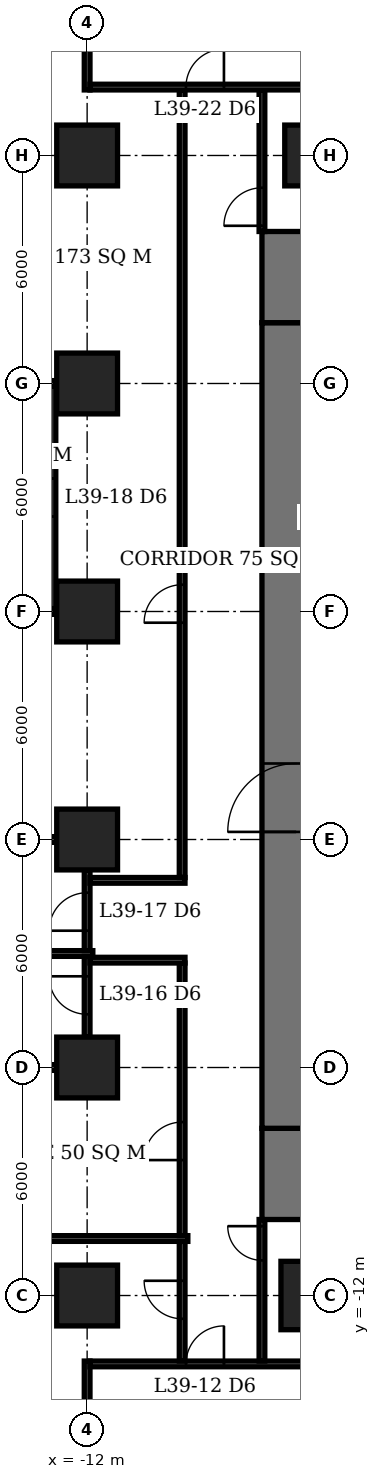
"""IFC4 building model, lengths in metres.
Left out: names, types, materials, properties, quantities, classifications, styles, units other than length and angle.
Written with IfcOpenShell. Run it as: python <this file> out.ifc"""

import sys

from ifc_helpers import new_model, si_unit, direction, frame, frame_2d, origin, origin_2d, place, context, subcontext, project, spatial, rectangle, extrude, element, fill, save


model = new_model("IFC4")
c1 = context("Model", 3, precision=1e-05, world=origin(), true_north=direction((0.0, 1.0)))
c2 = subcontext(c1, "Body", "Model", "MODEL_VIEW")
j1 = project(units=[si_unit("LENGTHUNIT", "METRE"), si_unit("PLANEANGLEUNIT", "RADIAN")], contexts=[c1])
p1 = place(None, origin())
s1 = spatial("IfcSite", under=j1, at=p1, CompositionType="ELEMENT")
p2 = place(p1, origin())
s2 = spatial("IfcBuilding", under=s1, at=p2, CompositionType="ELEMENT")
p3 = place(p2, frame((0.0, 0.0, 160.1)))
s3 = spatial("IfcBuildingStorey", under=s2, at=p3, CompositionType="ELEMENT", Elevation=160.1)
for number, where, z_axis, x_axis in (
    (1, (-12.0, -12.0, 0.0), (0.0, 0.0, 1.0), (1.0, 0.0, 0.0)),
    (2, (-12.0, -6.0, 0.0), (0.0, 0.0, 1.0), (1.0, 0.0, 0.0)),
    (3, (-12.0, 0.0, 0.0), (0.0, 0.0, 1.0), (1.0, 0.0, 0.0)),
    (4, (-12.0, 6.0, 0.0), (0.0, 0.0, 1.0), (1.0, 0.0, 0.0)),
    (5, (-12.0, 12.0, 0.0), (0.0, 0.0, 1.0), (1.0, 0.0, 0.0)),
    (6, (-12.0, 18.0, 0.0), (0.0, 0.0, 1.0), (1.0, 0.0, 0.0)),
):
    element("IfcColumn", number, at=place(p3, frame(where, z_axis=z_axis, x_axis=x_axis)), inside=s3, PredefinedType="COLUMN", context=c2, shape_type="SweptSolid", body=[
        extrude(rectangle(XDim=1.6, YDim=1.6, at=origin_2d()), origin(), (0.0, 0.0, 1.0), 3.9),
    ])
p4 = place(p3, frame((-6.0, -12.0, 0.0), z_axis=(0.0, 0.0, 1.0), x_axis=(1.0, 0.0, 0.0)))
e7 = element("IfcColumn", 7, at=p4, inside=s3, PredefinedType="COLUMN", context=c2, shape_type="SweptSolid", body=[
    extrude(rectangle(XDim=1.8, YDim=1.8, at=origin_2d()), origin(), (0.0, 0.0, 1.0), 3.9),
])
p5 = place(p3, frame((-6.0, 18.0, 0.0), z_axis=(0.0, 0.0, 1.0), x_axis=(1.0, 0.0, 0.0)))
e8 = element("IfcColumn", 8, at=p5, inside=s3, PredefinedType="COLUMN", context=c2, shape_type="SweptSolid", body=[
    extrude(rectangle(XDim=1.6, YDim=1.6, at=origin_2d()), origin(), (0.0, 0.0, 1.0), 3.9),
])
p6 = place(p3, frame((-6.5, -7.6, 0.0), z_axis=(0.0, 0.0, 1.0), x_axis=(0.0, 1.0, 0.0)))
e9 = element("IfcWall", 9, at=p6, inside=s3, PredefinedType="SHEAR", context=c2, shape_type="SweptSolid", body=[
    extrude(rectangle(XDim=21.2, YDim=1.8, at=frame_2d((10.6, 0.0))), origin(), (0.0, 0.0, 1.0), 3.9),
])
p7 = place(p6, frame((7.8, 0.0, 0.0)))
e10 = element("IfcOpeningElement", 10, at=p7, cuts=e9, PredefinedType="OPENING", context=c2, shape_type="SweptSolid", body=[
    extrude(rectangle(XDim=1.8, YDim=2.4, at=frame_2d((0.9, 1.2))), frame((0.0, 0.91, 0.0), z_axis=(0.0, -1.0, 0.0), x_axis=(1.0, 0.0, 0.0)), (0.0, 0.0, 1.0), 1.82),
])
for number, where, z_axis, x_axis in (
    (11, (-6.5, -10.0, 0.0), (0.0, 0.0, 1.0), (0.0, 1.0, 0.0)),
    (12, (-6.5, 13.6, 0.0), (0.0, 0.0, 1.0), (0.0, 1.0, 0.0)),
):
    element("IfcWall", number, at=place(p3, frame(where, z_axis=z_axis, x_axis=x_axis)), inside=s3, PredefinedType="SHEAR", context=c2, shape_type="SweptSolid", body=[
        extrude(rectangle(XDim=2.4, YDim=1.8, at=frame_2d((1.2, 0.0))), origin(), (0.0, 0.0, 1.0), 3.9),
    ])
p8 = place(p3, frame((-11.925, -13.8, 0.0), z_axis=(0.0, 0.0, 1.0), x_axis=(1.0, 0.0, 0.0)))
e13 = element("IfcWall", 13, at=p8, inside=s3, PredefinedType="PARTITIONING", context=c2, shape_type="SweptSolid", body=[
    extrude(rectangle(XDim=5.85, YDim=0.15, at=frame_2d((2.925, 0.0))), origin(), (0.0, 0.0, 1.0), 3.65),
])
p9 = place(p8, frame((2.525, 0.0, 0.0)))
e14 = element("IfcOpeningElement", 14, at=p9, cuts=e13, PredefinedType="OPENING", context=c2, shape_type="SweptSolid", body=[
    extrude(rectangle(XDim=1.0, YDim=2.1, at=frame_2d((0.5, 1.05))), frame((0.0, 0.085, 0.0), z_axis=(0.0, -1.0, 0.0), x_axis=(1.0, 0.0, 0.0)), (0.0, 0.0, 1.0), 0.17),
])
p10 = place(p3, frame((-17.35, -6.0, 0.0), z_axis=(0.0, 0.0, 1.0), x_axis=(1.0, 0.0, 0.0)))
e15 = element("IfcWall", 15, at=p10, inside=s3, PredefinedType="PARTITIONING", context=c2, shape_type="SweptSolid", body=[
    extrude(rectangle(XDim=4.55, YDim=0.15, at=frame_2d((2.275, 0.0))), origin(), (0.0, 0.0, 1.0), 3.65),
])
p11 = place(p3, frame((-19.4, -3.0, 0.0), z_axis=(0.0, 0.0, 1.0), x_axis=(1.0, 0.0, 0.0)))
e16 = element("IfcWall", 16, at=p11, inside=s3, PredefinedType="PARTITIONING", context=c2, shape_type="SweptSolid", body=[
    extrude(rectangle(XDim=7.55, YDim=0.15, at=frame_2d((3.775, 0.0))), origin(), (0.0, 0.0, 1.0), 3.65),
])
p12 = place(p3, frame((-17.35, 0.0, 0.0), z_axis=(0.0, 0.0, 1.0), x_axis=(1.0, 0.0, 0.0)))
e17 = element("IfcWall", 17, at=p12, inside=s3, PredefinedType="PARTITIONING", context=c2, shape_type="SweptSolid", body=[
    extrude(rectangle(XDim=4.55, YDim=0.15, at=frame_2d((2.275, 0.0))), origin(), (0.0, 0.0, 1.0), 3.65),
])
for number, where, z_axis, x_axis in (
    (18, (-17.35, 6.0, 0.0), (0.0, 0.0, 1.0), (1.0, 0.0, 0.0)),
    (19, (-17.35, 12.0, 0.0), (0.0, 0.0, 1.0), (1.0, 0.0, 0.0)),
):
    element("IfcWall", number, at=place(p3, frame(where, z_axis=z_axis, x_axis=x_axis)), inside=s3, PredefinedType="PARTITIONING", context=c2, shape_type="SweptSolid", body=[
        extrude(rectangle(XDim=4.525, YDim=0.15, at=frame_2d((2.263, 0.0))), origin(), (0.0, 0.0, 1.0), 3.65),
    ])
p13 = place(p3, frame((-11.925, 19.8, 0.0), z_axis=(0.0, 0.0, 1.0), x_axis=(1.0, 0.0, 0.0)))
e20 = element("IfcWall", 20, at=p13, inside=s3, PredefinedType="PARTITIONING", context=c2, shape_type="SweptSolid", body=[
    extrude(rectangle(XDim=5.85, YDim=0.15, at=frame_2d((2.925, 0.0))), origin(), (0.0, 0.0, 1.0), 3.65),
])
p14 = place(p13, frame((2.525, 0.0, 0.0)))
e21 = element("IfcOpeningElement", 21, at=p14, cuts=e20, PredefinedType="OPENING", context=c2, shape_type="SweptSolid", body=[
    extrude(rectangle(XDim=1.0, YDim=2.1, at=frame_2d((0.5, 1.05))), frame((0.0, 0.085, 0.0), z_axis=(0.0, -1.0, 0.0), x_axis=(1.0, 0.0, 0.0)), (0.0, 0.0, 1.0), 0.17),
])
p15 = place(p3, frame((-12.9, 6.075, 0.0), z_axis=(0.0, 0.0, 1.0), x_axis=(0.0, 1.0, 0.0)))
e22 = element("IfcWall", 22, at=p15, inside=s3, PredefinedType="PARTITIONING", context=c2, shape_type="SweptSolid", body=[
    extrude(rectangle(XDim=5.85, YDim=0.15, at=frame_2d((2.925, 0.0))), origin(), (0.0, 0.0, 1.0), 3.65),
])
p16 = place(p15, frame((2.425, 0.0, 0.0)))
e23 = element("IfcOpeningElement", 23, at=p16, cuts=e22, PredefinedType="OPENING", context=c2, shape_type="SweptSolid", body=[
    extrude(rectangle(XDim=1.0, YDim=2.1, at=frame_2d((0.5, 1.05))), frame((0.0, 0.085, 0.0), z_axis=(0.0, -1.0, 0.0), x_axis=(1.0, 0.0, 0.0)), (0.0, 0.0, 1.0), 0.17),
])
p17 = place(p3, frame((-12.0, -19.4, 0.0), z_axis=(0.0, 0.0, 1.0), x_axis=(0.0, 1.0, 0.0)))
e24 = element("IfcWall", 24, at=p17, inside=s3, PredefinedType="PARTITIONING", context=c2, shape_type="SweptSolid", body=[
    extrude(rectangle(XDim=5.675, YDim=0.15, at=frame_2d((2.837, 0.0))), origin(), (0.0, 0.0, 1.0), 3.65),
])
p18 = place(p3, frame((-12.0, -5.2, 0.0), z_axis=(0.0, 0.0, 1.0), x_axis=(0.0, 1.0, 0.0)))
e25 = element("IfcWall", 25, at=p18, inside=s3, PredefinedType="PARTITIONING", context=c2, shape_type="SweptSolid", body=[
    extrude(rectangle(XDim=2.125, YDim=0.15, at=frame_2d((1.062, 0.0))), origin(), (0.0, 0.0, 1.0), 3.65),
])
p19 = place(p18, frame((0.6, 0.0, 0.0)))
e26 = element("IfcOpeningElement", 26, at=p19, cuts=e25, PredefinedType="OPENING", context=c2, shape_type="SweptSolid", body=[
    extrude(rectangle(XDim=1.0, YDim=2.1, at=frame_2d((0.5, 1.05))), frame((0.0, 0.085, 0.0), z_axis=(0.0, -1.0, 0.0), x_axis=(1.0, 0.0, 0.0)), (0.0, 0.0, 1.0), 0.17),
])
p20 = place(p3, frame((-12.0, -2.925, 0.0), z_axis=(0.0, 0.0, 1.0), x_axis=(0.0, 1.0, 0.0)))
e27 = element("IfcWall", 27, at=p20, inside=s3, PredefinedType="PARTITIONING", context=c2, shape_type="SweptSolid", body=[
    extrude(rectangle(XDim=2.125, YDim=0.15, at=frame_2d((1.062, 0.0))), origin(), (0.0, 0.0, 1.0), 3.65),
])
p21 = place(p20, frame((0.525, 0.0, 0.0)))
e28 = element("IfcOpeningElement", 28, at=p21, cuts=e27, PredefinedType="OPENING", context=c2, shape_type="SweptSolid", body=[
    extrude(rectangle(XDim=1.0, YDim=2.1, at=frame_2d((0.5, 1.05))), frame((0.0, 0.085, 0.0), z_axis=(0.0, -1.0, 0.0), x_axis=(1.0, 0.0, 0.0)), (0.0, 0.0, 1.0), 0.17),
])
p22 = place(p3, frame((-12.0, 19.725, 0.0), z_axis=(0.0, 0.0, 1.0), x_axis=(0.0, 1.0, 0.0)))
e29 = element("IfcWall", 29, at=p22, inside=s3, PredefinedType="PARTITIONING", context=c2, shape_type="SweptSolid", body=[
    extrude(rectangle(XDim=3.54, YDim=0.15, at=frame_2d((1.77, 0.0))), origin(), (0.0, 0.0, 1.0), 3.65),
])
p23 = place(p3, frame((-19.4, -10.5, 0.0), z_axis=(0.0, 0.0, 1.0), x_axis=(1.0, 0.0, 0.0)))
e30 = element("IfcWall", 30, at=p23, inside=s3, PredefinedType="PARTITIONING", context=c2, shape_type="SweptSolid", body=[
    extrude(rectangle(XDim=10.05, YDim=0.15, at=frame_2d((5.025, 0.0))), origin(), (0.0, 0.0, 1.0), 3.65),
])
for number, where, z_axis, x_axis in (
    (31, (-11.925, -3.175, 0.0), (0.0, 0.0, 1.0), (1.0, 0.0, 0.0)),
    (32, (-11.925, -1.075, 0.0), (0.0, 0.0, 1.0), (1.0, 0.0, 0.0)),
):
    element("IfcWall", number, at=place(p3, frame(where, z_axis=z_axis, x_axis=x_axis)), inside=s3, PredefinedType="PARTITIONING", context=c2, shape_type="SweptSolid", body=[
        extrude(rectangle(XDim=2.5, YDim=0.15, at=frame_2d((1.25, 0.0))), origin(), (0.0, 0.0, 1.0), 3.65),
    ])
p24 = place(p3, frame((-9.5, -13.725, 0.0), z_axis=(0.0, 0.0, 1.0), x_axis=(0.0, 1.0, 0.0)))
e33 = element("IfcWall", 33, at=p24, inside=s3, PredefinedType="PARTITIONING", context=c2, shape_type="SweptSolid", body=[
    extrude(rectangle(XDim=3.15, YDim=0.15, at=frame_2d((1.575, 0.0))), origin(), (0.0, 0.0, 1.0), 3.65),
])
p25 = place(p24, frame((1.113, 0.0, 0.0)))
e34 = element("IfcOpeningElement", 34, at=p25, cuts=e33, PredefinedType="OPENING", context=c2, shape_type="SweptSolid", body=[
    extrude(rectangle(XDim=1.0, YDim=2.1, at=frame_2d((0.5, 1.05))), frame((0.0, 0.085, 0.0), z_axis=(0.0, -1.0, 0.0), x_axis=(1.0, 0.0, 0.0)), (0.0, 0.0, 1.0), 0.17),
])
p26 = place(p3, frame((-9.5, -10.425, 0.0), z_axis=(0.0, 0.0, 1.0), x_axis=(0.0, 1.0, 0.0)))
e35 = element("IfcWall", 35, at=p26, inside=s3, PredefinedType="PARTITIONING", context=c2, shape_type="SweptSolid", body=[
    extrude(rectangle(XDim=7.175, YDim=0.15, at=frame_2d((3.587, 0.0))), origin(), (0.0, 0.0, 1.0), 3.65),
])
p27 = place(p26, frame((1.989, 0.0, 0.0)))
e36 = element("IfcOpeningElement", 36, at=p27, cuts=e35, PredefinedType="OPENING", context=c2, shape_type="SweptSolid", body=[
    extrude(rectangle(XDim=1.0, YDim=2.1, at=frame_2d((0.5, 1.05))), frame((0.0, 0.085, 0.0), z_axis=(0.0, -1.0, 0.0), x_axis=(1.0, 0.0, 0.0)), (0.0, 0.0, 1.0), 0.17),
])
p28 = place(p3, frame((-9.5, -1.0, 0.0), z_axis=(0.0, 0.0, 1.0), x_axis=(0.0, 1.0, 0.0)))
e37 = element("IfcWall", 37, at=p28, inside=s3, PredefinedType="PARTITIONING", context=c2, shape_type="SweptSolid", body=[
    extrude(rectangle(XDim=20.725, YDim=0.15, at=frame_2d((10.363, 0.0))), origin(), (0.0, 0.0, 1.0), 3.65),
])
p29 = place(p28, frame((6.705, 0.0, 0.0)))
e38 = element("IfcOpeningElement", 38, at=p29, cuts=e37, PredefinedType="OPENING", context=c2, shape_type="SweptSolid", body=[
    extrude(rectangle(XDim=1.0, YDim=2.1, at=frame_2d((0.5, 1.05))), frame((0.0, 0.085, 0.0), z_axis=(0.0, -1.0, 0.0), x_axis=(1.0, 0.0, 0.0)), (0.0, 0.0, 1.0), 0.17),
])
p30 = place(p3, frame((-7.4, -13.725, 0.0), z_axis=(0.0, 0.0, 1.0), x_axis=(0.0, 1.0, 0.0)))
e39 = element("IfcWall", 39, at=p30, inside=s3, PredefinedType="PARTITIONING", context=c2, shape_type="SweptSolid", body=[
    extrude(rectangle(XDim=3.725, YDim=0.15, at=frame_2d((1.863, 0.0))), origin(), (0.0, 0.0, 1.0), 3.65),
])
p31 = place(p30, frame((2.65, 0.0, 0.0)))
e40 = element("IfcOpeningElement", 40, at=p31, cuts=e39, PredefinedType="OPENING", context=c2, shape_type="SweptSolid", body=[
    extrude(rectangle(XDim=0.9, YDim=2.1, at=frame_2d((0.45, 1.05))), frame((0.0, 0.085, 0.0), z_axis=(0.0, -1.0, 0.0), x_axis=(1.0, 0.0, 0.0)), (0.0, 0.0, 1.0), 0.17),
])
p32 = place(p3, frame((-7.4, 16.0, 0.0), z_axis=(0.0, 0.0, 1.0), x_axis=(0.0, 1.0, 0.0)))
e41 = element("IfcWall", 41, at=p32, inside=s3, PredefinedType="PARTITIONING", context=c2, shape_type="SweptSolid", body=[
    extrude(rectangle(XDim=3.725, YDim=0.15, at=frame_2d((1.863, 0.0))), origin(), (0.0, 0.0, 1.0), 3.65),
])
p33 = place(p32, frame((0.15, 0.0, 0.0)))
e42 = element("IfcOpeningElement", 42, at=p33, cuts=e41, PredefinedType="OPENING", context=c2, shape_type="SweptSolid", body=[
    extrude(rectangle(XDim=1.0, YDim=2.1, at=frame_2d((0.5, 1.05))), frame((0.0, 0.085, 0.0), z_axis=(0.0, -1.0, 0.0), x_axis=(1.0, 0.0, 0.0)), (0.0, 0.0, 1.0), 0.17),
])
p34 = place(p7, origin())
e43 = element("IfcDoor", 43, at=p34, inside=s3, OperationType="DOUBLE_DOOR_SINGLE_SWING", PredefinedType="DOOR", context=c2, shape_type="SweptSolid", body=[
    extrude(rectangle(XDim=1.8, YDim=2.4, at=frame_2d((0.9, 1.2))), frame((0.0, 0.025, 0.0), z_axis=(0.0, -1.0, 0.0), x_axis=(1.0, 0.0, 0.0)), (0.0, 0.0, 1.0), 0.05),
])
fill(e10, e43)
p35 = place(p9, origin())
e44 = element("IfcDoor", 44, at=p35, inside=s3, OperationType="SINGLE_SWING_RIGHT", PredefinedType="DOOR", context=c2, shape_type="SweptSolid", body=[
    extrude(rectangle(XDim=1.0, YDim=2.1, at=frame_2d((0.5, 1.05))), frame((0.0, 0.025, 0.0), z_axis=(0.0, -1.0, 0.0), x_axis=(1.0, 0.0, 0.0)), (0.0, 0.0, 1.0), 0.05),
])
fill(e14, e44)
p36 = place(p19, origin())
e45 = element("IfcDoor", 45, at=p36, inside=s3, OperationType="SINGLE_SWING_RIGHT", PredefinedType="DOOR", context=c2, shape_type="SweptSolid", body=[
    extrude(rectangle(XDim=1.0, YDim=2.1, at=frame_2d((0.5, 1.05))), frame((0.0, 0.025, 0.0), z_axis=(0.0, -1.0, 0.0), x_axis=(1.0, 0.0, 0.0)), (0.0, 0.0, 1.0), 0.05),
])
fill(e26, e45)
p37 = place(p21, origin())
e46 = element("IfcDoor", 46, at=p37, inside=s3, OperationType="SINGLE_SWING_LEFT", PredefinedType="DOOR", context=c2, shape_type="SweptSolid", body=[
    extrude(rectangle(XDim=1.0, YDim=2.1, at=frame_2d((0.5, 1.05))), frame((0.0, 0.025, 0.0), z_axis=(0.0, -1.0, 0.0), x_axis=(1.0, 0.0, 0.0)), (0.0, 0.0, 1.0), 0.05),
])
fill(e28, e46)
p38 = place(p16, origin())
e47 = element("IfcDoor", 47, at=p38, inside=s3, OperationType="SINGLE_SWING_RIGHT", PredefinedType="DOOR", context=c2, shape_type="SweptSolid", body=[
    extrude(rectangle(XDim=1.0, YDim=2.1, at=frame_2d((0.5, 1.05))), frame((0.0, 0.025, 0.0), z_axis=(0.0, -1.0, 0.0), x_axis=(1.0, 0.0, 0.0)), (0.0, 0.0, 1.0), 0.05),
])
fill(e23, e47)
p39 = place(p14, origin())
e48 = element("IfcDoor", 48, at=p39, inside=s3, OperationType="SINGLE_SWING_RIGHT", PredefinedType="DOOR", context=c2, shape_type="SweptSolid", body=[
    extrude(rectangle(XDim=1.0, YDim=2.1, at=frame_2d((0.5, 1.05))), frame((0.0, 0.025, 0.0), z_axis=(0.0, -1.0, 0.0), x_axis=(1.0, 0.0, 0.0)), (0.0, 0.0, 1.0), 0.05),
])
fill(e21, e48)
p40 = place(p25, origin())
e49 = element("IfcDoor", 49, at=p40, inside=s3, OperationType="SINGLE_SWING_RIGHT", PredefinedType="DOOR", context=c2, shape_type="SweptSolid", body=[
    extrude(rectangle(XDim=1.0, YDim=2.1, at=frame_2d((0.5, 1.05))), frame((0.0, 0.025, 0.0), z_axis=(0.0, -1.0, 0.0), x_axis=(1.0, 0.0, 0.0)), (0.0, 0.0, 1.0), 0.05),
])
fill(e34, e49)
p41 = place(p27, origin())
e50 = element("IfcDoor", 50, at=p41, inside=s3, OperationType="SINGLE_SWING_LEFT", PredefinedType="DOOR", context=c2, shape_type="SweptSolid", body=[
    extrude(rectangle(XDim=1.0, YDim=2.1, at=frame_2d((0.5, 1.05))), frame((0.0, 0.025, 0.0), z_axis=(0.0, -1.0, 0.0), x_axis=(1.0, 0.0, 0.0)), (0.0, 0.0, 1.0), 0.05),
])
fill(e36, e50)
p42 = place(p29, origin())
e51 = element("IfcDoor", 51, at=p42, inside=s3, OperationType="SINGLE_SWING_LEFT", PredefinedType="DOOR", context=c2, shape_type="SweptSolid", body=[
    extrude(rectangle(XDim=1.0, YDim=2.1, at=frame_2d((0.5, 1.05))), frame((0.0, 0.025, 0.0), z_axis=(0.0, -1.0, 0.0), x_axis=(1.0, 0.0, 0.0)), (0.0, 0.0, 1.0), 0.05),
])
fill(e38, e51)
p43 = place(p33, origin())
e52 = element("IfcDoor", 52, at=p43, inside=s3, OperationType="SINGLE_SWING_LEFT", PredefinedType="DOOR", context=c2, shape_type="SweptSolid", body=[
    extrude(rectangle(XDim=1.0, YDim=2.1, at=frame_2d((0.5, 1.05))), frame((0.0, 0.025, 0.0), z_axis=(0.0, -1.0, 0.0), x_axis=(1.0, 0.0, 0.0)), (0.0, 0.0, 1.0), 0.05),
])
fill(e42, e52)
p44 = place(p31, origin())
e53 = element("IfcDoor", 53, at=p44, inside=s3, OperationType="SINGLE_SWING_RIGHT", PredefinedType="DOOR", context=c2, shape_type="SweptSolid", body=[
    extrude(rectangle(XDim=0.9, YDim=2.1, at=frame_2d((0.45, 1.05))), frame((0.0, 0.025, 0.0), z_axis=(0.0, -1.0, 0.0), x_axis=(1.0, 0.0, 0.0)), (0.0, 0.0, 1.0), 0.05),
])
fill(e40, e53)
save(model, sys.argv[1])
